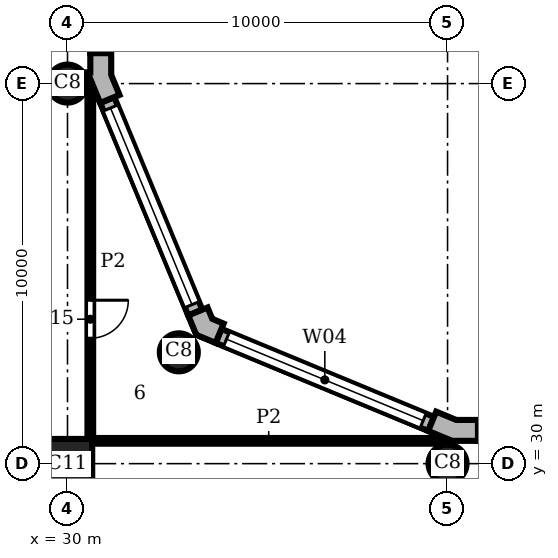
"""IFC4 building model, lengths in metres.
Left out: names, types, materials, properties, quantities, classifications, styles, units other than length and angle.
Written with IfcOpenShell. Run it as: python <this file> out.ifc"""

import sys

from ifc_helpers import new_model, si_unit, direction, frame, frame_2d, origin, origin_2d, place, context, subcontext, project, spatial, polyline, rectangle, circle, outline, extrude, element, fill, save


model = new_model("IFC4")
c1 = context("Model", 3, precision=1e-05, world=origin(), true_north=direction((0.0, 1.0)))
c2 = subcontext(c1, "Body", "Model", "MODEL_VIEW")
j1 = project(units=[si_unit("LENGTHUNIT", "METRE"), si_unit("PLANEANGLEUNIT", "RADIAN")], contexts=[c1])
p1 = place(None, origin())
s1 = spatial("IfcSite", under=j1, at=p1, CompositionType="ELEMENT")
p2 = place(p1, origin())
s2 = spatial("IfcBuilding", under=s1, at=p2, CompositionType="ELEMENT")
p3 = place(p2, frame((0.0, 0.0, 205.8)))
s3 = spatial("IfcBuildingStorey", under=s2, at=p3, CompositionType="ELEMENT", Elevation=205.8)
for number, where, z_axis, x_axis in (
    (1, (40.0, 30.0, 0.0), (0.0, 0.0, 1.0), (1.0, 0.0, 0.0)),
    (2, (32.929, 32.929, 0.0), (0.0, 0.0, 1.0), (1.0, 0.0, 0.0)),
    (3, (30.0, 40.0, 0.0), (0.0, 0.0, 1.0), (1.0, 0.0, 0.0)),
):
    element("IfcColumn", number, at=place(p3, frame(where, z_axis=z_axis, x_axis=x_axis)), inside=s3, PredefinedType="COLUMN", context=c2, shape_type="SweptSolid", body=[
        extrude(circle(Radius=0.5, at=origin_2d()), origin(), (0.0, 0.0, 1.0), 3.9),
    ])
p4 = place(p3, frame((30.0, 30.0, 0.0), z_axis=(0.0, 0.0, 1.0), x_axis=(1.0, 0.0, 0.0)))
e4 = element("IfcColumn", 4, at=p4, inside=s3, PredefinedType="COLUMN", context=c2, shape_type="SweptSolid", body=[
    extrude(rectangle(XDim=1.3, YDim=1.3, at=origin_2d()), origin(), (0.0, 0.0, 1.0), 3.9),
])
p5 = place(p3, origin())
e5 = element("IfcWall", 5, at=p5, inside=s3, PredefinedType="SOLIDWALL", context=c2, shape_type="SweptSolid", body=[
    extrude(outline(polyline([(40.8, 31.0), (40.8, 31.15), (40.229, 31.15), (39.701, 31.369), (39.644, 31.23), (39.49, 30.861), (40.119, 30.6), (40.8, 30.6), (40.8, 31.0)])), origin(), (0.0, 0.0, 1.0), 3.9),
])
e6 = element("IfcWall", 6, at=p5, inside=s3, PredefinedType="SOLIDWALL", context=c2, shape_type="SweptSolid", body=[
    extrude(outline(polyline([(34.051, 33.547), (34.108, 33.685), (33.809, 33.809), (33.685, 34.108), (33.547, 34.051), (33.177, 33.898), (33.388, 33.388), (33.898, 33.177), (34.051, 33.547)])), origin(), (0.0, 0.0, 1.0), 3.9),
])
e7 = element("IfcWall", 7, at=p5, inside=s3, PredefinedType="SOLIDWALL", context=c2, shape_type="SweptSolid", body=[
    extrude(outline(polyline([(30.62, 39.995), (30.62, 40.071), (30.861, 39.49), (31.23, 39.644), (31.369, 39.701), (31.15, 40.229), (31.15, 40.8), (31.0, 40.8), (30.6, 40.8), (30.6, 40.295), (30.5, 40.295), (30.5, 39.995), (30.62, 39.995)])), origin(), (0.0, 0.0, 1.0), 3.9),
])
p6 = place(p3, frame((59.2, 30.8, 0.0), z_axis=(0.0, 0.0, 1.0), x_axis=(-1.0, 0.0, 0.0)))
e8 = element("IfcWall", 8, at=p6, inside=s3, PredefinedType="SOLIDWALL", context=c2, shape_type="SweptSolid", body=[
    extrude(rectangle(XDim=18.4, YDim=0.4, at=frame_2d((9.2, 0.0))), origin(), (0.0, 0.0, 1.0), 3.9),
])
p7 = place(p6, frame((0.2, 0.0, 0.9)))
e9 = element("IfcOpeningElement", 9, at=p7, cuts=e8, PredefinedType="OPENING", context=c2, shape_type="SweptSolid", body=[
    extrude(rectangle(XDim=8.0, YDim=2.35, at=frame_2d((4.0, 1.175))), frame((0.0, 0.21, 0.0), z_axis=(0.0, -1.0, 0.0), x_axis=(1.0, 0.0, 0.0)), (0.0, 0.0, 1.0), 0.42),
])
p8 = place(p6, frame((10.2, 0.0, 0.9)))
e10 = element("IfcOpeningElement", 10, at=p8, cuts=e8, PredefinedType="OPENING", context=c2, shape_type="SweptSolid", body=[
    extrude(rectangle(XDim=8.0, YDim=2.35, at=frame_2d((4.0, 1.175))), frame((0.0, 0.21, 0.0), z_axis=(0.0, -1.0, 0.0), x_axis=(1.0, 0.0, 0.0)), (0.0, 0.0, 1.0), 0.42),
])
p9 = place(p3, frame((39.567, 31.045, 0.0), z_axis=(0.0, 0.0, 1.0), x_axis=(-0.923891000409, 0.382655745237, 0.0)))
e11 = element("IfcWall", 11, at=p9, inside=s3, PredefinedType="SOLIDWALL", context=c2, shape_type="SweptSolid", body=[
    extrude(rectangle(XDim=6.053, YDim=0.4, at=frame_2d((3.027, 0.0))), origin(), (0.0, 0.0, 1.0), 3.9),
])
p10 = place(p9, frame((0.227, 0.0, 0.9)))
e12 = element("IfcOpeningElement", 12, at=p10, cuts=e11, PredefinedType="OPENING", context=c2, shape_type="SweptSolid", body=[
    extrude(rectangle(XDim=5.6, YDim=2.35, at=frame_2d((2.8, 1.175))), frame((0.0, 0.21, 0.0), z_axis=(0.0, -1.0, 0.0), x_axis=(1.0, 0.0, 0.0)), (0.0, 0.0, 1.0), 0.42),
])
p11 = place(p3, frame((33.362, 33.974, 0.0), z_axis=(0.0, 0.0, 1.0), x_axis=(-0.382655745237, 0.923891000409, 0.0)))
e13 = element("IfcWall", 13, at=p11, inside=s3, PredefinedType="SOLIDWALL", context=c2, shape_type="SweptSolid", body=[
    extrude(rectangle(XDim=6.053, YDim=0.4, at=frame_2d((3.027, 0.0))), origin(), (0.0, 0.0, 1.0), 3.9),
])
p12 = place(p11, frame((0.227, 0.0, 0.9)))
e14 = element("IfcOpeningElement", 14, at=p12, cuts=e13, PredefinedType="OPENING", context=c2, shape_type="SweptSolid", body=[
    extrude(rectangle(XDim=5.6, YDim=2.35, at=frame_2d((2.8, 1.175))), frame((0.0, 0.21, 0.0), z_axis=(0.0, -1.0, 0.0), x_axis=(1.0, 0.0, 0.0)), (0.0, 0.0, 1.0), 0.42),
])
p13 = place(p3, frame((30.8, 40.8, 0.0), z_axis=(0.0, 0.0, 1.0), x_axis=(0.0, 1.0, 0.0)))
e15 = element("IfcWall", 15, at=p13, inside=s3, PredefinedType="SOLIDWALL", context=c2, shape_type="SweptSolid", body=[
    extrude(rectangle(XDim=18.4, YDim=0.4, at=frame_2d((9.2, 0.0))), origin(), (0.0, 0.0, 1.0), 3.9),
])
p14 = place(p13, frame((0.2, 0.0, 0.9)))
e16 = element("IfcOpeningElement", 16, at=p14, cuts=e15, PredefinedType="OPENING", context=c2, shape_type="SweptSolid", body=[
    extrude(rectangle(XDim=8.0, YDim=2.35, at=frame_2d((4.0, 1.175))), frame((0.0, 0.21, 0.0), z_axis=(0.0, -1.0, 0.0), x_axis=(1.0, 0.0, 0.0)), (0.0, 0.0, 1.0), 0.42),
])
p15 = place(p13, frame((10.2, 0.0, 0.9)))
e17 = element("IfcOpeningElement", 17, at=p15, cuts=e15, PredefinedType="OPENING", context=c2, shape_type="SweptSolid", body=[
    extrude(rectangle(XDim=8.0, YDim=2.35, at=frame_2d((4.0, 1.175))), frame((0.0, 0.21, 0.0), z_axis=(0.0, -1.0, 0.0), x_axis=(1.0, 0.0, 0.0)), (0.0, 0.0, 1.0), 0.42),
])
p16 = place(p3, frame((30.6, 30.65, 0.0), z_axis=(0.0, 0.0, 1.0), x_axis=(0.0, 1.0, 0.0)))
e18 = element("IfcWall", 18, at=p16, inside=s3, PredefinedType="PARTITIONING", context=c2, shape_type="SweptSolid", body=[
    extrude(rectangle(XDim=9.288, YDim=0.15, at=frame_2d((4.644, 0.0))), origin(), (0.0, 0.0, 1.0), 3.58),
])
p17 = place(p16, frame((2.65, 0.0, 0.0)))
e19 = element("IfcOpeningElement", 19, at=p17, cuts=e18, PredefinedType="OPENING", context=c2, shape_type="SweptSolid", body=[
    extrude(rectangle(XDim=1.0, YDim=2.1, at=frame_2d((0.5, 1.05))), frame((0.0, 0.085, 0.0), z_axis=(0.0, -1.0, 0.0), x_axis=(1.0, 0.0, 0.0)), (0.0, 0.0, 1.0), 0.17),
])
p18 = place(p3, frame((30.65, 30.6, 0.0), z_axis=(0.0, 0.0, 1.0), x_axis=(1.0, 0.0, 0.0)))
e20 = element("IfcWall", 20, at=p18, inside=s3, PredefinedType="PARTITIONING", context=c2, shape_type="SweptSolid", body=[
    extrude(rectangle(XDim=9.288, YDim=0.15, at=frame_2d((4.644, 0.0))), origin(), (0.0, 0.0, 1.0), 3.58),
])
p19 = place(p10, origin())
e21 = element("IfcWindow", 21, at=p19, inside=s3, PartitioningType="SINGLE_PANEL", PredefinedType="WINDOW", context=c2, shape_type="SweptSolid", body=[
    extrude(rectangle(XDim=5.6, YDim=2.35, at=frame_2d((2.8, 1.175))), frame((0.0, 0.16, 0.0), z_axis=(0.0, -1.0, 0.0), x_axis=(1.0, 0.0, 0.0)), (0.0, 0.0, 1.0), 0.06),
])
fill(e12, e21)
p20 = place(p12, origin())
e22 = element("IfcWindow", 22, at=p20, inside=s3, PartitioningType="SINGLE_PANEL", PredefinedType="WINDOW", context=c2, shape_type="SweptSolid", body=[
    extrude(rectangle(XDim=5.6, YDim=2.35, at=frame_2d((2.8, 1.175))), frame((0.0, 0.16, 0.0), z_axis=(0.0, -1.0, 0.0), x_axis=(1.0, 0.0, 0.0)), (0.0, 0.0, 1.0), 0.06),
])
fill(e14, e22)
p21 = place(p17, frame((1.0, 0.0, 0.0), z_axis=(0.0, 0.0, 1.0), x_axis=(-1.0, 0.0, 0.0)))
e23 = element("IfcDoor", 23, at=p21, inside=s3, OperationType="SINGLE_SWING_LEFT", PredefinedType="DOOR", context=c2, shape_type="SweptSolid", body=[
    extrude(rectangle(XDim=1.0, YDim=2.1, at=frame_2d((0.5, 1.05))), frame((0.0, 0.025, 0.0), z_axis=(0.0, -1.0, 0.0), x_axis=(1.0, 0.0, 0.0)), (0.0, 0.0, 1.0), 0.05),
])
fill(e19, e23)
save(model, sys.argv[1])
